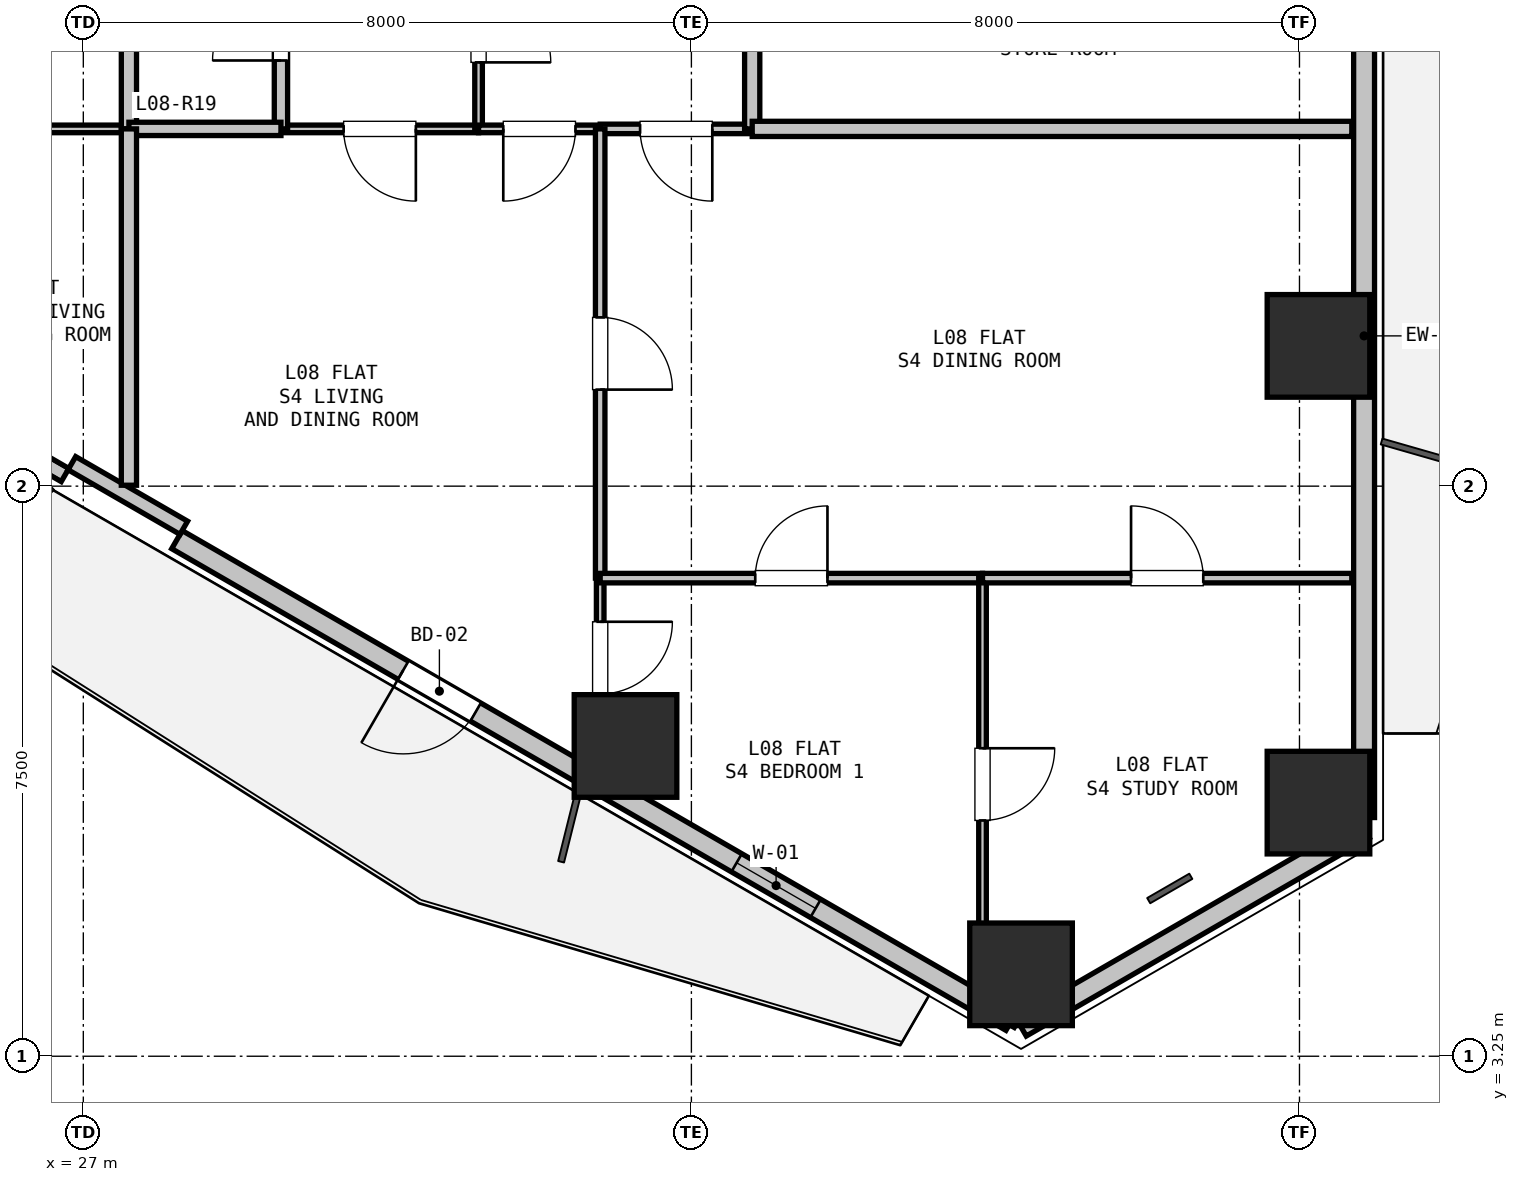
"""IFC4 building model, lengths in metres.
Left out: names, types, materials, properties, quantities, classifications, styles, units other than length and angle.
Written with IfcOpenShell. Run it as: python <this file> out.ifc"""

import sys

from ifc_helpers import new_model, si_unit, direction, frame, frame_2d, origin, origin_2d, place, context, subcontext, project, spatial, rectangle, hollow_rectangle, extrude, element, fill, save


model = new_model("IFC4")
c1 = context("Model", 3, precision=1e-05, world=origin(), true_north=direction((0.0, 1.0)))
c2 = subcontext(c1, "Body", "Model", "MODEL_VIEW")
j1 = project(units=[si_unit("LENGTHUNIT", "METRE"), si_unit("PLANEANGLEUNIT", "RADIAN")], contexts=[c1])
p1 = place(None, origin())
s1 = spatial("IfcSite", under=j1, at=p1, CompositionType="ELEMENT")
p2 = place(p1, origin())
s2 = spatial("IfcBuilding", under=s1, at=p2, CompositionType="ELEMENT")
p3 = place(p2, frame((0.0, 0.0, 32.4)))
s3 = spatial("IfcBuildingStorey", under=s2, at=p3, CompositionType="ELEMENT", Elevation=32.4)
for number, where, z_axis, x_axis in (
    (1, (43.25, 12.595, 0.0), (0.0, 0.0, 1.0), (1.0, 0.0, 0.0)),
    (2, (43.25, 6.587, 0.0), (0.0, 0.0, 1.0), (1.0, 0.0, 0.0)),
    (3, (39.337, 4.327, 0.0), (0.0, 0.0, 1.0), (1.0, 0.0, 0.0)),
    (4, (34.133, 7.332, 0.0), (0.0, 0.0, 1.0), (1.0, 0.0, 0.0)),
):
    element("IfcColumn", number, at=place(p3, frame(where, z_axis=z_axis, x_axis=x_axis)), inside=s3, PredefinedType="COLUMN", context=c2, shape_type="SweptSolid", body=[
        extrude(hollow_rectangle(XDim=1.35, YDim=1.35, WallThickness=0.036, at=origin_2d()), origin(), (0.0, 0.0, 1.0), 3.3),
    ])
p4 = place(p3, frame((43.85, 6.24, 0.0), z_axis=(0.0, 0.0, 1.0), x_axis=(-0.866043601342, -0.499968479581, 0.0)))
e5 = element("IfcWall", 5, at=p4, inside=s3, PredefinedType="SOLIDWALL", context=c2, shape_type="SweptSolid", body=[
    extrude(rectangle(XDim=5.211, YDim=0.275, at=frame_2d((2.605, 0.0))), origin(), (0.0, 0.0, 1.0), 2.66),
])
p5 = place(p3, frame((43.85, 19.063, 0.0), z_axis=(0.0, 0.0, 1.0), x_axis=(0.0, -1.0, 0.0)))
e6 = element("IfcWall", 6, at=p5, inside=s3, PredefinedType="SOLIDWALL", context=c2, shape_type="SweptSolid", body=[
    extrude(rectangle(XDim=12.673, YDim=0.275, at=frame_2d((6.336, 0.0))), origin(), (0.0, 0.0, 1.0), 2.66),
])
p6 = place(p3, frame((39.207, 3.71, 0.0), z_axis=(0.0, 0.0, 1.0), x_axis=(-0.86603192154, 0.499988710747, 0.0)))
e7 = element("IfcWall", 7, at=p6, inside=s3, PredefinedType="SOLIDWALL", context=c2, shape_type="SweptSolid", body=[
    extrude(rectangle(XDim=12.673, YDim=0.275, at=frame_2d((6.336, 0.0))), origin(), (0.0, 0.0, 1.0), 2.66),
])
p7 = place(p6, frame((8.136, 0.0, 0.0)))
e8 = element("IfcOpeningElement", 8, at=p7, cuts=e7, PredefinedType="OPENING", context=c2, shape_type="SweptSolid", body=[
    extrude(rectangle(XDim=1.1, YDim=2.1, at=frame_2d((0.55, 1.05))), frame((0.0, 0.147, 0.0), z_axis=(0.0, -1.0, 0.0), x_axis=(1.0, 0.0, 0.0)), (0.0, 0.0, 1.0), 0.295),
])
p8 = place(p6, frame((2.971, 0.0, 0.9)))
e9 = element("IfcOpeningElement", 9, at=p8, cuts=e7, PredefinedType="OPENING", context=c2, shape_type="SweptSolid", body=[
    extrude(rectangle(XDim=1.2, YDim=1.4, at=frame_2d((0.6, 0.7))), frame((0.0, 0.147, 0.0), z_axis=(0.0, -1.0, 0.0), x_axis=(1.0, 0.0, 0.0)), (0.0, 0.0, 1.0), 0.295),
])
p9 = place(p3, frame((26.76, 10.896, 0.0), z_axis=(0.0, 0.0, 1.0), x_axis=(-0.866027351828, 0.499996625875, 0.0)))
e10 = element("IfcWall", 10, at=p9, inside=s3, PredefinedType="PARAPET", context=c2, shape_type="SweptSolid", body=[
    extrude(rectangle(XDim=11.973, YDim=0.2, at=frame_2d((5.987, 0.0))), origin(), (0.0, 0.0, 1.0), 0.2),
])
p10 = place(p3, frame((28.322, 10.202, 0.0), z_axis=(0.0, 0.0, 1.0), x_axis=(-0.86605165483, 0.499954529098, 0.0)))
e11 = element("IfcWall", 11, at=p10, inside=s3, PredefinedType="PARAPET", context=c2, shape_type="SweptSolid", body=[
    extrude(rectangle(XDim=1.7, YDim=0.2, at=frame_2d((0.85, 0.0))), origin(), (0.0, 0.0, 1.0), 2.66),
])
p11 = place(p3, frame((32.2, 15.45, 0.0), z_axis=(0.0, 0.0, 1.0), x_axis=(-1.0, 0.0, 0.0)))
e12 = element("IfcWall", 12, at=p11, inside=s3, PredefinedType="PARTITIONING", context=c2, shape_type="SweptSolid", body=[
    extrude(rectangle(XDim=2.6, YDim=0.1, at=frame_2d((1.3, 0.0))), origin(), (0.0, 0.0, 1.0), 3.04),
])
p12 = place(p11, frame((0.825, 0.0, 0.0)))
e13 = element("IfcOpeningElement", 13, at=p12, cuts=e12, PredefinedType="OPENING", context=c2, shape_type="SweptSolid", body=[
    extrude(rectangle(XDim=0.95, YDim=2.1, at=frame_2d((0.475, 1.05))), frame((0.0, 0.06, 0.0), z_axis=(0.0, -1.0, 0.0), x_axis=(1.0, 0.0, 0.0)), (0.0, 0.0, 1.0), 0.12),
])
p13 = place(p3, frame((29.6, 15.45, 0.0), z_axis=(0.0, 0.0, 1.0), x_axis=(0.0, 1.0, 0.0)))
e14 = element("IfcWall", 14, at=p13, inside=s3, PredefinedType="PLUMBINGWALL", context=c2, shape_type="SweptSolid", body=[
    extrude(rectangle(XDim=2.7, YDim=0.175, at=frame_2d((1.35, 0.0))), origin(), (0.0, 0.0, 1.0), 3.04),
])
p14 = place(p13, frame((0.9, 0.0, 0.0)))
e15 = element("IfcOpeningElement", 15, at=p14, cuts=e14, PredefinedType="OPENING", context=c2, shape_type="SweptSolid", body=[
    extrude(rectangle(XDim=0.9, YDim=2.1, at=frame_2d((0.45, 1.05))), frame((0.0, 0.097, 0.0), z_axis=(0.0, -1.0, 0.0), x_axis=(1.0, 0.0, 0.0)), (0.0, 0.0, 1.0), 0.195),
])
p15 = place(p3, frame((32.2, 18.15, 0.0), z_axis=(0.0, 0.0, 1.0), x_axis=(0.0, -1.0, 0.0)))
e16 = element("IfcWall", 16, at=p15, inside=s3, PredefinedType="PARTITIONING", context=c2, shape_type="SweptSolid", body=[
    extrude(rectangle(XDim=2.7, YDim=0.1, at=frame_2d((1.35, 0.0))), origin(), (0.0, 0.0, 1.0), 3.04),
])
p16 = place(p15, frame((0.875, 0.0, 0.0)))
e17 = element("IfcOpeningElement", 17, at=p16, cuts=e16, PredefinedType="OPENING", context=c2, shape_type="SweptSolid", body=[
    extrude(rectangle(XDim=0.95, YDim=2.1, at=frame_2d((0.475, 1.05))), frame((0.0, 0.06, 0.0), z_axis=(0.0, -1.0, 0.0), x_axis=(1.0, 0.0, 0.0)), (0.0, 0.0, 1.0), 0.12),
])
p17 = place(p3, frame((27.6, 15.45, 0.0), z_axis=(0.0, 0.0, 1.0), x_axis=(-1.0, 0.0, 0.0)))
e18 = element("IfcWall", 18, at=p17, inside=s3, PredefinedType="PARTITIONING", context=c2, shape_type="SweptSolid", body=[
    extrude(rectangle(XDim=3.2, YDim=0.1, at=frame_2d((1.6, 0.0))), origin(), (0.0, 0.0, 1.0), 2.338),
])
p18 = place(p17, frame((1.125, 0.0, 0.0)))
e19 = element("IfcOpeningElement", 19, at=p18, cuts=e18, PredefinedType="OPENING", context=c2, shape_type="SweptSolid", body=[
    extrude(rectangle(XDim=0.95, YDim=2.1, at=frame_2d((0.475, 1.05))), frame((0.0, 0.06, 0.0), z_axis=(0.0, -1.0, 0.0), x_axis=(1.0, 0.0, 0.0)), (0.0, 0.0, 1.0), 0.12),
])
p19 = place(p3, frame((27.6, 18.15, 0.0), z_axis=(0.0, 0.0, 1.0), x_axis=(0.0, -1.0, 0.0)))
e20 = element("IfcWall", 20, at=p19, inside=s3, PredefinedType="PARTITIONING", context=c2, shape_type="SweptSolid", body=[
    extrude(rectangle(XDim=2.7, YDim=0.2, at=frame_2d((1.35, 0.0))), origin(), (0.0, 0.0, 1.0), 3.04),
])
p20 = place(p3, frame((29.6, 15.45, 0.0), z_axis=(0.0, 0.0, 1.0), x_axis=(-1.0, 0.0, 0.0)))
e21 = element("IfcWall", 21, at=p20, inside=s3, PredefinedType="PLUMBINGWALL", context=c2, shape_type="SweptSolid", body=[
    extrude(rectangle(XDim=2.0, YDim=0.175, at=frame_2d((1.0, 0.0))), origin(), (0.0, 0.0, 1.0), 3.04),
])
p21 = place(p3, frame((35.8, 15.45, 0.0), z_axis=(0.0, 0.0, 1.0), x_axis=(-1.0, 0.0, 0.0)))
e22 = element("IfcWall", 22, at=p21, inside=s3, PredefinedType="PARTITIONING", context=c2, shape_type="SweptSolid", body=[
    extrude(rectangle(XDim=2.0, YDim=0.125, at=frame_2d((1.0, 0.0))), origin(), (0.0, 0.0, 1.0), 3.04),
])
p22 = place(p21, frame((0.525, 0.0, 0.0)))
e23 = element("IfcOpeningElement", 23, at=p22, cuts=e22, PredefinedType="OPENING", context=c2, shape_type="SweptSolid", body=[
    extrude(rectangle(XDim=0.95, YDim=2.1, at=frame_2d((0.475, 1.05))), frame((0.0, 0.073, 0.0), z_axis=(0.0, -1.0, 0.0), x_axis=(1.0, 0.0, 0.0)), (0.0, 0.0, 1.0), 0.145),
])
p23 = place(p3, frame((33.8, 15.45, 0.0), z_axis=(0.0, 0.0, 1.0), x_axis=(-1.0, 0.0, 0.0)))
e24 = element("IfcWall", 24, at=p23, inside=s3, PredefinedType="PARTITIONING", context=c2, shape_type="SweptSolid", body=[
    extrude(rectangle(XDim=1.6, YDim=0.1, at=frame_2d((0.8, 0.0))), origin(), (0.0, 0.0, 1.0), 3.04),
])
p24 = place(p23, frame((0.325, 0.0, 0.0)))
e25 = element("IfcOpeningElement", 25, at=p24, cuts=e24, PredefinedType="OPENING", context=c2, shape_type="SweptSolid", body=[
    extrude(rectangle(XDim=0.95, YDim=2.1, at=frame_2d((0.475, 1.05))), frame((0.0, 0.06, 0.0), z_axis=(0.0, -1.0, 0.0), x_axis=(1.0, 0.0, 0.0)), (0.0, 0.0, 1.0), 0.12),
])
p25 = place(p3, frame((35.8, 18.15, 0.0), z_axis=(0.0, 0.0, 1.0), x_axis=(0.0, -1.0, 0.0)))
e26 = element("IfcWall", 26, at=p25, inside=s3, PredefinedType="PARTITIONING", context=c2, shape_type="SweptSolid", body=[
    extrude(rectangle(XDim=2.7, YDim=0.2, at=frame_2d((1.35, 0.0))), origin(), (0.0, 0.0, 1.0), 3.04),
])
p26 = place(p3, frame((43.688, 15.45, 0.0), z_axis=(0.0, 0.0, 1.0), x_axis=(-1.0, 0.0, 0.0)))
e27 = element("IfcWall", 27, at=p26, inside=s3, PredefinedType="PARTITIONING", context=c2, shape_type="SweptSolid", body=[
    extrude(rectangle(XDim=7.888, YDim=0.2, at=frame_2d((3.944, 0.0))), origin(), (0.0, 0.0, 1.0), 2.338),
])
p27 = place(p3, frame((27.6, 15.45, 0.0), z_axis=(0.0, 0.0, 1.0), x_axis=(0.0, -1.0, 0.0)))
e28 = element("IfcWall", 28, at=p27, inside=s3, PredefinedType="PARTITIONING", context=c2, shape_type="SweptSolid", body=[
    extrude(rectangle(XDim=4.688, YDim=0.2, at=frame_2d((2.344, 0.0))), origin(), (0.0, 0.0, 1.0), 2.338),
])
p28 = place(p3, frame((33.8, 15.45, 0.0), z_axis=(0.0, 0.0, 1.0), x_axis=(0.0, -1.0, 0.0)))
e29 = element("IfcWall", 29, at=p28, inside=s3, PredefinedType="PARTITIONING", context=c2, shape_type="SweptSolid", body=[
    extrude(rectangle(XDim=5.91, YDim=0.125, at=frame_2d((2.955, 0.0))), origin(), (0.0, 0.0, 1.0), 3.04),
])
p29 = place(p28, frame((2.48, 0.0, 0.0)))
e30 = element("IfcOpeningElement", 30, at=p29, cuts=e29, PredefinedType="OPENING", context=c2, shape_type="SweptSolid", body=[
    extrude(rectangle(XDim=0.95, YDim=2.1, at=frame_2d((0.475, 1.05))), frame((0.0, 0.073, 0.0), z_axis=(0.0, -1.0, 0.0), x_axis=(1.0, 0.0, 0.0)), (0.0, 0.0, 1.0), 0.145),
])
p30 = place(p3, frame((33.8, 9.54, 0.0), z_axis=(0.0, 0.0, 1.0), x_axis=(0.0, -1.0, 0.0)))
e31 = element("IfcWall", 31, at=p30, inside=s3, PredefinedType="PARTITIONING", context=c2, shape_type="SweptSolid", body=[
    extrude(rectangle(XDim=2.522, YDim=0.1, at=frame_2d((1.261, 0.0))), origin(), (0.0, 0.0, 1.0), 2.338),
])
p31 = place(p30, frame((0.574, 0.0, 0.0)))
e32 = element("IfcOpeningElement", 32, at=p31, cuts=e31, PredefinedType="OPENING", context=c2, shape_type="SweptSolid", body=[
    extrude(rectangle(XDim=0.95, YDim=2.1, at=frame_2d((0.475, 1.05))), frame((0.0, 0.06, 0.0), z_axis=(0.0, -1.0, 0.0), x_axis=(1.0, 0.0, 0.0)), (0.0, 0.0, 1.0), 0.12),
])
p32 = place(p3, frame((33.8, 9.54, 0.0), z_axis=(0.0, 0.0, 1.0), x_axis=(1.0, 0.0, 0.0)))
e33 = element("IfcWall", 33, at=p32, inside=s3, PredefinedType="PARTITIONING", context=c2, shape_type="SweptSolid", body=[
    extrude(rectangle(XDim=5.03, YDim=0.125, at=frame_2d((2.515, 0.0))), origin(), (0.0, 0.0, 1.0), 3.04),
])
p33 = place(p32, frame((2.04, 0.0, 0.0)))
e34 = element("IfcOpeningElement", 34, at=p33, cuts=e33, PredefinedType="OPENING", context=c2, shape_type="SweptSolid", body=[
    extrude(rectangle(XDim=0.95, YDim=2.1, at=frame_2d((0.475, 1.05))), frame((0.0, 0.073, 0.0), z_axis=(0.0, -1.0, 0.0), x_axis=(1.0, 0.0, 0.0)), (0.0, 0.0, 1.0), 0.145),
])
p34 = place(p3, frame((38.83, 9.54, 0.0), z_axis=(0.0, 0.0, 1.0), x_axis=(0.0, -1.0, 0.0)))
e35 = element("IfcWall", 35, at=p34, inside=s3, PredefinedType="PARTITIONING", context=c2, shape_type="SweptSolid", body=[
    extrude(rectangle(XDim=5.426, YDim=0.1, at=frame_2d((2.713, 0.0))), origin(), (0.0, 0.0, 1.0), 2.65),
])
p35 = place(p34, frame((2.238, 0.0, 0.0)))
e36 = element("IfcOpeningElement", 36, at=p35, cuts=e35, PredefinedType="OPENING", context=c2, shape_type="SweptSolid", body=[
    extrude(rectangle(XDim=0.95, YDim=2.1, at=frame_2d((0.475, 1.05))), frame((0.0, 0.06, 0.0), z_axis=(0.0, -1.0, 0.0), x_axis=(1.0, 0.0, 0.0)), (0.0, 0.0, 1.0), 0.12),
])
p36 = place(p3, frame((38.83, 9.54, 0.0), z_axis=(0.0, 0.0, 1.0), x_axis=(1.0, 0.0, 0.0)))
e37 = element("IfcWall", 37, at=p36, inside=s3, PredefinedType="PARTITIONING", context=c2, shape_type="SweptSolid", body=[
    extrude(rectangle(XDim=4.858, YDim=0.125, at=frame_2d((2.429, 0.0))), origin(), (0.0, 0.0, 1.0), 2.338),
])
p37 = place(p36, frame((1.954, 0.0, 0.0)))
e38 = element("IfcOpeningElement", 38, at=p37, cuts=e37, PredefinedType="OPENING", context=c2, shape_type="SweptSolid", body=[
    extrude(rectangle(XDim=0.95, YDim=2.1, at=frame_2d((0.475, 1.05))), frame((0.0, 0.073, 0.0), z_axis=(0.0, -1.0, 0.0), x_axis=(1.0, 0.0, 0.0)), (0.0, 0.0, 1.0), 0.145),
])
p38 = place(p3, frame((39.272, 3.672, 0.0), z_axis=(0.0, 0.0, 1.0), x_axis=(-0.866442544969, 0.49927679324, 0.0)))
e39 = element("IfcWall", 39, at=p38, inside=s3, PredefinedType="PARTITIONING", context=c2, shape_type="SweptSolid", body=[
    extrude(rectangle(XDim=0.142, YDim=0.1, at=frame_2d((0.071, 0.0))), origin(), (0.0, 0.0, 1.0), 3.04),
])
p39 = place(p7, origin())
e40 = element("IfcDoor", 40, at=p39, inside=s3, OperationType="SINGLE_SWING_RIGHT", PredefinedType="DOOR", context=c2, shape_type="SweptSolid", body=[
    extrude(rectangle(XDim=1.1, YDim=2.1, at=frame_2d((0.55, 1.05))), frame((0.0, 0.025, 0.0), z_axis=(0.0, -1.0, 0.0), x_axis=(1.0, 0.0, 0.0)), (0.0, 0.0, 1.0), 0.05),
])
fill(e8, e40)
p40 = place(p8, origin())
e41 = element("IfcWindow", 41, at=p40, inside=s3, PartitioningType="SINGLE_PANEL", PredefinedType="WINDOW", context=c2, shape_type="SweptSolid", body=[
    extrude(rectangle(XDim=1.2, YDim=1.4, at=frame_2d((0.6, 0.7))), frame((0.0, 0.03, 0.0), z_axis=(0.0, -1.0, 0.0), x_axis=(1.0, 0.0, 0.0)), (0.0, 0.0, 1.0), 0.06),
])
fill(e9, e41)
p41 = place(p14, origin())
e42 = element("IfcDoor", 42, at=p41, inside=s3, OperationType="SINGLE_SWING_LEFT", PredefinedType="DOOR", context=c2, shape_type="SweptSolid", body=[
    extrude(rectangle(XDim=0.9, YDim=2.1, at=frame_2d((0.45, 1.05))), frame((0.0, 0.025, 0.0), z_axis=(0.0, -1.0, 0.0), x_axis=(1.0, 0.0, 0.0)), (0.0, 0.0, 1.0), 0.05),
])
fill(e15, e42)
p42 = place(p16, origin())
e43 = element("IfcDoor", 43, at=p42, inside=s3, OperationType="SINGLE_SWING_RIGHT", PredefinedType="DOOR", context=c2, shape_type="SweptSolid", body=[
    extrude(rectangle(XDim=0.95, YDim=2.1, at=frame_2d((0.475, 1.05))), frame((0.0, 0.025, 0.0), z_axis=(0.0, -1.0, 0.0), x_axis=(1.0, 0.0, 0.0)), (0.0, 0.0, 1.0), 0.05),
])
fill(e17, e43)
p43 = place(p12, origin())
e44 = element("IfcDoor", 44, at=p43, inside=s3, OperationType="SINGLE_SWING_LEFT", PredefinedType="DOOR", context=c2, shape_type="SweptSolid", body=[
    extrude(rectangle(XDim=0.95, YDim=2.1, at=frame_2d((0.475, 1.05))), frame((0.0, 0.025, 0.0), z_axis=(0.0, -1.0, 0.0), x_axis=(1.0, 0.0, 0.0)), (0.0, 0.0, 1.0), 0.05),
])
fill(e13, e44)
p44 = place(p24, origin())
e45 = element("IfcDoor", 45, at=p44, inside=s3, OperationType="SINGLE_SWING_RIGHT", PredefinedType="DOOR", context=c2, shape_type="SweptSolid", body=[
    extrude(rectangle(XDim=0.95, YDim=2.1, at=frame_2d((0.475, 1.05))), frame((0.0, 0.025, 0.0), z_axis=(0.0, -1.0, 0.0), x_axis=(1.0, 0.0, 0.0)), (0.0, 0.0, 1.0), 0.05),
])
fill(e25, e45)
p45 = place(p22, origin())
e46 = element("IfcDoor", 46, at=p45, inside=s3, OperationType="SINGLE_SWING_LEFT", PredefinedType="DOOR", context=c2, shape_type="SweptSolid", body=[
    extrude(rectangle(XDim=0.95, YDim=2.1, at=frame_2d((0.475, 1.05))), frame((0.0, 0.025, 0.0), z_axis=(0.0, -1.0, 0.0), x_axis=(1.0, 0.0, 0.0)), (0.0, 0.0, 1.0), 0.05),
])
fill(e23, e46)
p46 = place(p31, origin())
e47 = element("IfcDoor", 47, at=p46, inside=s3, OperationType="SINGLE_SWING_LEFT", PredefinedType="DOOR", context=c2, shape_type="SweptSolid", body=[
    extrude(rectangle(XDim=0.95, YDim=2.1, at=frame_2d((0.475, 1.05))), frame((0.0, 0.025, 0.0), z_axis=(0.0, -1.0, 0.0), x_axis=(1.0, 0.0, 0.0)), (0.0, 0.0, 1.0), 0.05),
])
fill(e32, e47)
p47 = place(p29, origin())
e48 = element("IfcDoor", 48, at=p47, inside=s3, OperationType="SINGLE_SWING_RIGHT", PredefinedType="DOOR", context=c2, shape_type="SweptSolid", body=[
    extrude(rectangle(XDim=0.95, YDim=2.1, at=frame_2d((0.475, 1.05))), frame((0.0, 0.025, 0.0), z_axis=(0.0, -1.0, 0.0), x_axis=(1.0, 0.0, 0.0)), (0.0, 0.0, 1.0), 0.05),
])
fill(e30, e48)
p48 = place(p35, origin())
e49 = element("IfcDoor", 49, at=p48, inside=s3, OperationType="SINGLE_SWING_LEFT", PredefinedType="DOOR", context=c2, shape_type="SweptSolid", body=[
    extrude(rectangle(XDim=0.95, YDim=2.1, at=frame_2d((0.475, 1.05))), frame((0.0, 0.025, 0.0), z_axis=(0.0, -1.0, 0.0), x_axis=(1.0, 0.0, 0.0)), (0.0, 0.0, 1.0), 0.05),
])
fill(e36, e49)
p49 = place(p33, origin())
e50 = element("IfcDoor", 50, at=p49, inside=s3, OperationType="SINGLE_SWING_RIGHT", PredefinedType="DOOR", context=c2, shape_type="SweptSolid", body=[
    extrude(rectangle(XDim=0.95, YDim=2.1, at=frame_2d((0.475, 1.05))), frame((0.0, 0.025, 0.0), z_axis=(0.0, -1.0, 0.0), x_axis=(1.0, 0.0, 0.0)), (0.0, 0.0, 1.0), 0.05),
])
fill(e34, e50)
p50 = place(p37, origin())
e51 = element("IfcDoor", 51, at=p50, inside=s3, OperationType="SINGLE_SWING_LEFT", PredefinedType="DOOR", context=c2, shape_type="SweptSolid", body=[
    extrude(rectangle(XDim=0.95, YDim=2.1, at=frame_2d((0.475, 1.05))), frame((0.0, 0.025, 0.0), z_axis=(0.0, -1.0, 0.0), x_axis=(1.0, 0.0, 0.0)), (0.0, 0.0, 1.0), 0.05),
])
fill(e38, e51)
save(model, sys.argv[1])
